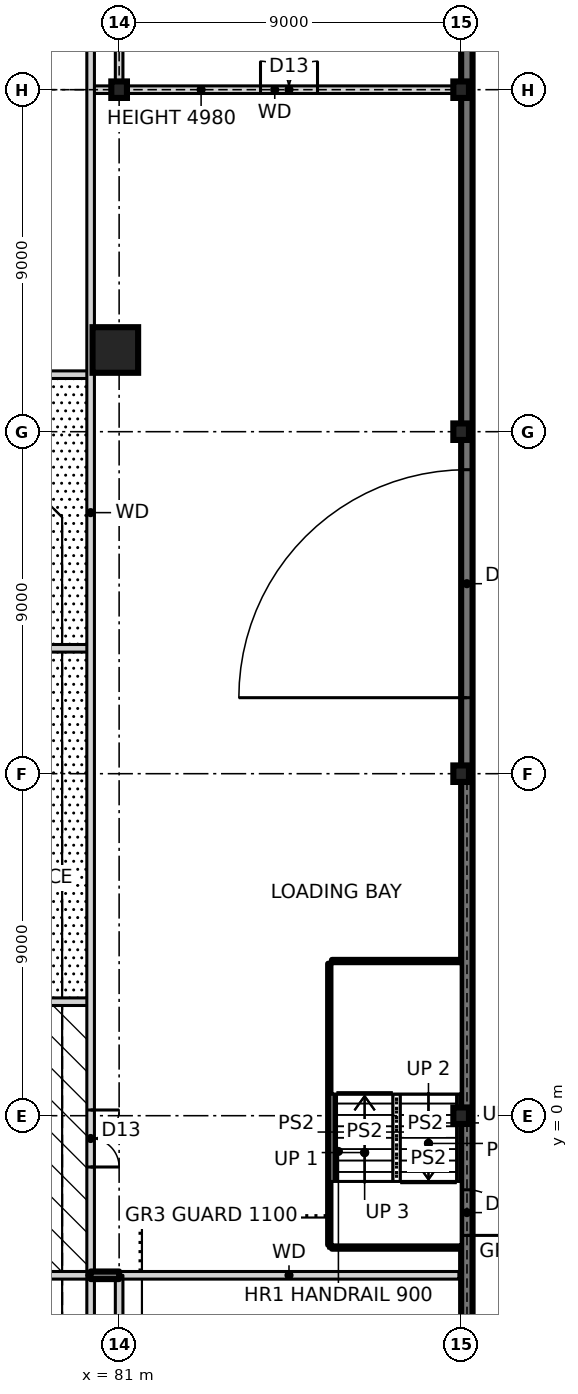
"""IFC4 building model, lengths in metres.
Left out: names, types, materials, properties, quantities, classifications, styles, units other than length and angle.
Written with IfcOpenShell. Run it as: python <this file> out.ifc"""

import sys

from ifc_helpers import new_model, si_unit, direction, frame, frame_2d, origin, origin_2d, place, context, subcontext, project, spatial, rectangle, hollow_rectangle, i_section, extrude, element, fill, save


model = new_model("IFC4")
c1 = context("Model", 3, precision=1e-05, world=origin(), true_north=direction((0.0, 1.0)))
c2 = subcontext(c1, "Body", "Model", "MODEL_VIEW")
j1 = project(units=[si_unit("LENGTHUNIT", "METRE"), si_unit("PLANEANGLEUNIT", "RADIAN")], contexts=[c1])
p1 = place(None, origin())
s1 = spatial("IfcSite", under=j1, at=p1, CompositionType="ELEMENT")
p2 = place(p1, origin())
s2 = spatial("IfcBuilding", under=s1, at=p2, CompositionType="ELEMENT")
p3 = place(p2, origin())
s3 = spatial("IfcBuildingStorey", under=s2, at=p3, CompositionType="ELEMENT", Elevation=0.0)
p4 = place(p3, frame((80.9, 20.15, 0.0), z_axis=(0.0, 0.0, 1.0), x_axis=(1.0, 0.0, 0.0)))
e1 = element("IfcColumn", 1, at=p4, inside=s3, PredefinedType="COLUMN", context=c2, shape_type="SweptSolid", body=[
    extrude(hollow_rectangle(XDim=1.2, YDim=1.2, WallThickness=0.07, at=origin_2d()), origin(), (0.0, 0.0, 1.0), 6.0),
])
for number, where, z_axis, x_axis in (
    (2, (81.0, 27.0, 0.0), (0.0, 0.0, 1.0), (1.0, 0.0, 0.0)),
    (3, (90.0, 0.0, 0.0), (0.0, 0.0, 1.0), (1.0, 0.0, 0.0)),
    (4, (90.0, 9.0, 0.0), (0.0, 0.0, 1.0), (1.0, 0.0, 0.0)),
    (5, (90.0, 18.0, 0.0), (0.0, 0.0, 1.0), (1.0, 0.0, 0.0)),
    (6, (90.0, 27.0, 0.0), (0.0, 0.0, 1.0), (1.0, 0.0, 0.0)),
):
    element("IfcColumn", number, at=place(p3, frame(where, z_axis=z_axis, x_axis=x_axis)), inside=s3, PredefinedType="COLUMN", context=c2, shape_type="SweptSolid", body=[
        extrude(i_section(OverallWidth=0.411, OverallDepth=0.434, WebThickness=0.036, FlangeThickness=0.057, at=origin_2d()), origin(), (0.0, 0.0, 1.0), 6.0),
    ])
p5 = place(p3, frame((90.15, -36.3, -0.25), z_axis=(0.0, 0.0, 1.0), x_axis=(0.0, 1.0, 0.0)))
e7 = element("IfcWall", 7, at=p5, inside=s3, PredefinedType="SOLIDWALL", context=c2, shape_type="SweptSolid", body=[
    extrude(rectangle(XDim=72.6, YDim=0.3, at=frame_2d((36.3, 0.0))), origin(), (0.0, 0.0, 1.0), 5.23),
])
p6 = place(p5, frame((33.15, 0.0, 0.25)))
e8 = element("IfcOpeningElement", 8, at=p6, cuts=e7, PredefinedType="OPENING", context=c2, shape_type="SweptSolid", body=[
    extrude(rectangle(XDim=1.2, YDim=2.4, at=frame_2d((0.6, 1.2))), frame((0.0, 0.16, 0.0), z_axis=(0.0, -1.0, 0.0), x_axis=(1.0, 0.0, 0.0)), (0.0, 0.0, 1.0), 0.32),
])
p7 = place(p5, frame((47.3, 0.0, 0.25)))
e9 = element("IfcOpeningElement", 9, at=p7, cuts=e7, PredefinedType="OPENING", context=c2, shape_type="SweptSolid", body=[
    extrude(rectangle(XDim=6.0, YDim=4.5, at=frame_2d((3.0, 2.25))), frame((0.0, 0.16, 0.0), z_axis=(0.0, -1.0, 0.0), x_axis=(1.0, 0.0, 0.0)), (0.0, 0.0, 1.0), 0.32),
])
p8 = place(p3, frame((76.9, -4.2, 0.0), z_axis=(0.0, 0.0, 1.0), x_axis=(1.0, 0.0, 0.0)))
e10 = element("IfcWall", 10, at=p8, inside=s3, PredefinedType="SOLIDWALL", context=c2, shape_type="SweptSolid", body=[
    extrude(rectangle(XDim=3.35, YDim=0.2, at=frame_2d((1.675, 0.0))), origin(), (0.0, 0.0, 1.0), 5.75),
])
p9 = place(p8, frame((0.95, 0.0, 0.0)))
e11 = element("IfcOpeningElement", 11, at=p9, cuts=e10, PredefinedType="OPENING", context=c2, shape_type="SweptSolid", body=[
    extrude(rectangle(XDim=0.85, YDim=2.1, at=frame_2d((0.425, 1.05))), frame((0.0, 0.11, 0.0), z_axis=(0.0, -1.0, 0.0), x_axis=(1.0, 0.0, 0.0)), (0.0, 0.0, 1.0), 0.22),
])
p10 = place(p3, frame((80.25, -4.2, -0.25), z_axis=(0.0, 0.0, 1.0), x_axis=(1.0, 0.0, 0.0)))
e12 = element("IfcWall", 12, at=p10, inside=s3, PredefinedType="SOLIDWALL", context=c2, shape_type="SweptSolid", body=[
    extrude(rectangle(XDim=0.75, YDim=0.2, at=frame_2d((0.375, 0.0))), origin(), (0.0, 0.0, 1.0), 6.25),
])
p11 = place(p3, frame((81.0, -4.2, 0.0), z_axis=(0.0, 0.0, 1.0), x_axis=(1.0, 0.0, 0.0)))
e13 = element("IfcWall", 13, at=p11, inside=s3, PredefinedType="SOLIDWALL", context=c2, shape_type="SweptSolid", body=[
    extrude(rectangle(XDim=8.94, YDim=0.2, at=frame_2d((4.47, 0.0))), origin(), (0.0, 0.0, 1.0), 5.75),
])
p12 = place(p3, frame((86.6, -3.4, 0.0), z_axis=(0.0, 0.0, 1.0), x_axis=(1.0, 0.0, 0.0)))
e14 = element("IfcWall", 14, at=p12, inside=s3, PredefinedType="SOLIDWALL", context=c2, shape_type="SweptSolid", body=[
    extrude(rectangle(XDim=3.34, YDim=0.2, at=frame_2d((1.67, 0.0))), origin(), (0.0, 0.0, 1.0), 6.0),
])
p13 = place(p3, frame((74.3, 3.0, 0.0), z_axis=(0.0, 0.0, 1.0), x_axis=(1.0, 0.0, 0.0)))
e15 = element("IfcWall", 15, at=p13, inside=s3, PredefinedType="SOLIDWALL", context=c2, shape_type="SweptSolid", body=[
    extrude(rectangle(XDim=5.95, YDim=0.2, at=frame_2d((2.975, 0.0))), origin(), (0.0, 0.0, 1.0), 5.75),
])
p14 = place(p3, frame((86.6, 4.0, 0.0), z_axis=(0.0, 0.0, 1.0), x_axis=(1.0, 0.0, 0.0)))
e16 = element("IfcWall", 16, at=p14, inside=s3, PredefinedType="SOLIDWALL", context=c2, shape_type="SweptSolid", body=[
    extrude(rectangle(XDim=3.34, YDim=0.2, at=frame_2d((1.67, 0.0))), origin(), (0.0, 0.0, 1.0), 6.0),
])
p15 = place(p3, frame((45.0, 12.3, 0.0), z_axis=(0.0, 0.0, 1.0), x_axis=(1.0, 0.0, 0.0)))
e17 = element("IfcWall", 17, at=p15, inside=s3, PredefinedType="SOLIDWALL", context=c2, shape_type="SweptSolid", body=[
    extrude(rectangle(XDim=35.25, YDim=0.2, at=frame_2d((17.625, 0.0))), origin(), (0.0, 0.0, 1.0), 5.75),
])
p16 = place(p15, frame((8.1, 0.0, 0.0)))
e18 = element("IfcOpeningElement", 18, at=p16, cuts=e17, PredefinedType="OPENING", context=c2, shape_type="SweptSolid", body=[
    extrude(rectangle(XDim=1.8, YDim=2.1, at=frame_2d((0.9, 1.05))), frame((0.0, 0.11, 0.0), z_axis=(0.0, -1.0, 0.0), x_axis=(1.0, 0.0, 0.0)), (0.0, 0.0, 1.0), 0.22),
])
p17 = place(p15, frame((22.75, 0.0, 0.0)))
e19 = element("IfcOpeningElement", 19, at=p17, cuts=e17, PredefinedType="OPENING", context=c2, shape_type="SweptSolid", body=[
    extrude(rectangle(XDim=1.8, YDim=2.1, at=frame_2d((0.9, 1.05))), frame((0.0, 0.11, 0.0), z_axis=(0.0, -1.0, 0.0), x_axis=(1.0, 0.0, 0.0)), (0.0, 0.0, 1.0), 0.22),
])
p18 = place(p3, frame((63.0, 19.5, 0.0), z_axis=(0.0, 0.0, 1.0), x_axis=(1.0, 0.0, 0.0)))
e20 = element("IfcWall", 20, at=p18, inside=s3, PredefinedType="SOLIDWALL", context=c2, shape_type="SweptSolid", body=[
    extrude(rectangle(XDim=17.25, YDim=0.2, at=frame_2d((8.625, 0.0))), origin(), (0.0, 0.0, 1.0), 5.75),
])
p19 = place(p3, frame((80.25, 27.0, 0.0), z_axis=(0.0, 0.0, 1.0), x_axis=(1.0, 0.0, 0.0)))
e21 = element("IfcWall", 21, at=p19, inside=s3, PredefinedType="SOLIDWALL", context=c2, shape_type="SweptSolid", body=[
    extrude(rectangle(XDim=9.69, YDim=0.2, at=frame_2d((4.845, 0.0))), origin(), (0.0, 0.0, 1.0), 4.98),
])
p20 = place(p19, frame((4.47, 0.0, 0.0)))
e22 = element("IfcOpeningElement", 22, at=p20, cuts=e21, PredefinedType="OPENING", context=c2, shape_type="SweptSolid", body=[
    extrude(rectangle(XDim=1.5, YDim=2.4, at=frame_2d((0.75, 1.2))), frame((0.0, 0.11, 0.0), z_axis=(0.0, -1.0, 0.0), x_axis=(1.0, 0.0, 0.0)), (0.0, 0.0, 1.0), 0.22),
])
p21 = place(p3, frame((86.6, -3.4, 0.0), z_axis=(0.0, 0.0, 1.0), x_axis=(0.0, 1.0, 0.0)))
e23 = element("IfcWall", 23, at=p21, inside=s3, PredefinedType="SOLIDWALL", context=c2, shape_type="SweptSolid", body=[
    extrude(rectangle(XDim=7.4, YDim=0.2, at=frame_2d((3.7, 0.0))), origin(), (0.0, 0.0, 1.0), 6.0),
])
p22 = place(p3, frame((81.0, -19.5, 0.0), z_axis=(0.0, 0.0, 1.0), x_axis=(0.0, 1.0, 0.0)))
e24 = element("IfcWall", 24, at=p22, inside=s3, PredefinedType="SOLIDWALL", context=c2, shape_type="SweptSolid", body=[
    extrude(rectangle(XDim=15.3, YDim=0.2, at=frame_2d((7.65, 0.0))), origin(), (0.0, 0.0, 1.0), 6.0),
])
p23 = place(p3, frame((81.0, 27.0, 0.0), z_axis=(0.0, 0.0, 1.0), x_axis=(0.0, 1.0, 0.0)))
e25 = element("IfcWall", 25, at=p23, inside=s3, PredefinedType="SOLIDWALL", context=c2, shape_type="SweptSolid", body=[
    extrude(rectangle(XDim=8.94, YDim=0.2, at=frame_2d((4.47, 0.0))), origin(), (0.0, 0.0, 1.0), 4.98),
])
p24 = place(p3, frame((80.25, -19.5, 0.0), z_axis=(0.0, 0.0, 1.0), x_axis=(0.0, 1.0, 0.0)))
e26 = element("IfcWall", 26, at=p24, inside=s3, PredefinedType="SOLIDWALL", context=c2, shape_type="SweptSolid", body=[
    extrude(rectangle(XDim=15.3, YDim=0.2, at=frame_2d((7.65, 0.0))), origin(), (0.0, 0.0, 1.0), 6.0),
])
p25 = place(p3, frame((80.25, -4.2, 0.0), z_axis=(0.0, 0.0, 1.0), x_axis=(0.0, 1.0, 0.0)))
e27 = element("IfcWall", 27, at=p25, inside=s3, PredefinedType="SOLIDWALL", context=c2, shape_type="SweptSolid", body=[
    extrude(rectangle(XDim=40.14, YDim=0.2, at=frame_2d((20.07, 0.0))), origin(), (0.0, 0.0, 1.0), 5.75),
])
p26 = place(p25, frame((2.85, 0.0, 0.0)))
e28 = element("IfcOpeningElement", 28, at=p26, cuts=e27, PredefinedType="OPENING", context=c2, shape_type="SweptSolid", body=[
    extrude(rectangle(XDim=1.5, YDim=2.4, at=frame_2d((0.75, 1.2))), frame((0.0, 0.11, 0.0), z_axis=(0.0, -1.0, 0.0), x_axis=(1.0, 0.0, 0.0)), (0.0, 0.0, 1.0), 0.22),
])
p27 = place(p6, frame((1.2, 0.0, 0.0), z_axis=(0.0, 0.0, 1.0), x_axis=(-1.0, 0.0, 0.0)))
e29 = element("IfcDoor", 29, at=p27, inside=s3, OperationType="SINGLE_SWING_RIGHT", PredefinedType="DOOR", context=c2, shape_type="SweptSolid", body=[
    extrude(rectangle(XDim=1.2, YDim=2.4, at=frame_2d((0.6, 1.2))), frame((0.0, 0.025, 0.0), z_axis=(0.0, -1.0, 0.0), x_axis=(1.0, 0.0, 0.0)), (0.0, 0.0, 1.0), 0.05),
])
fill(e8, e29)
p28 = place(p7, origin())
e30 = element("IfcDoor", 30, at=p28, inside=s3, OperationType="USERDEFINED", PredefinedType="GATE", context=c2, shape_type="SweptSolid", body=[
    extrude(rectangle(XDim=6.0, YDim=4.5, at=frame_2d((3.0, 2.25))), frame((0.0, 0.025, 0.0), z_axis=(0.0, -1.0, 0.0), x_axis=(1.0, 0.0, 0.0)), (0.0, 0.0, 1.0), 0.05),
])
fill(e9, e30)
p29 = place(p20, origin())
e31 = element("IfcDoor", 31, at=p29, inside=s3, OperationType="DOUBLE_DOOR_SINGLE_SWING", PredefinedType="DOOR", context=c2, shape_type="SweptSolid", body=[
    extrude(rectangle(XDim=1.5, YDim=2.4, at=frame_2d((0.75, 1.2))), frame((0.0, 0.025, 0.0), z_axis=(0.0, -1.0, 0.0), x_axis=(1.0, 0.0, 0.0)), (0.0, 0.0, 1.0), 0.05),
])
fill(e22, e31)
p30 = place(p26, frame((1.5, 0.0, 0.0), z_axis=(0.0, 0.0, 1.0), x_axis=(-1.0, 0.0, 0.0)))
e32 = element("IfcDoor", 32, at=p30, inside=s3, OperationType="DOUBLE_DOOR_SINGLE_SWING", PredefinedType="DOOR", context=c2, shape_type="SweptSolid", body=[
    extrude(rectangle(XDim=1.5, YDim=2.4, at=frame_2d((0.75, 1.2))), frame((0.0, 0.025, 0.0), z_axis=(0.0, -1.0, 0.0), x_axis=(1.0, 0.0, 0.0)), (0.0, 0.0, 1.0), 0.05),
])
fill(e28, e32)
save(model, sys.argv[1])
